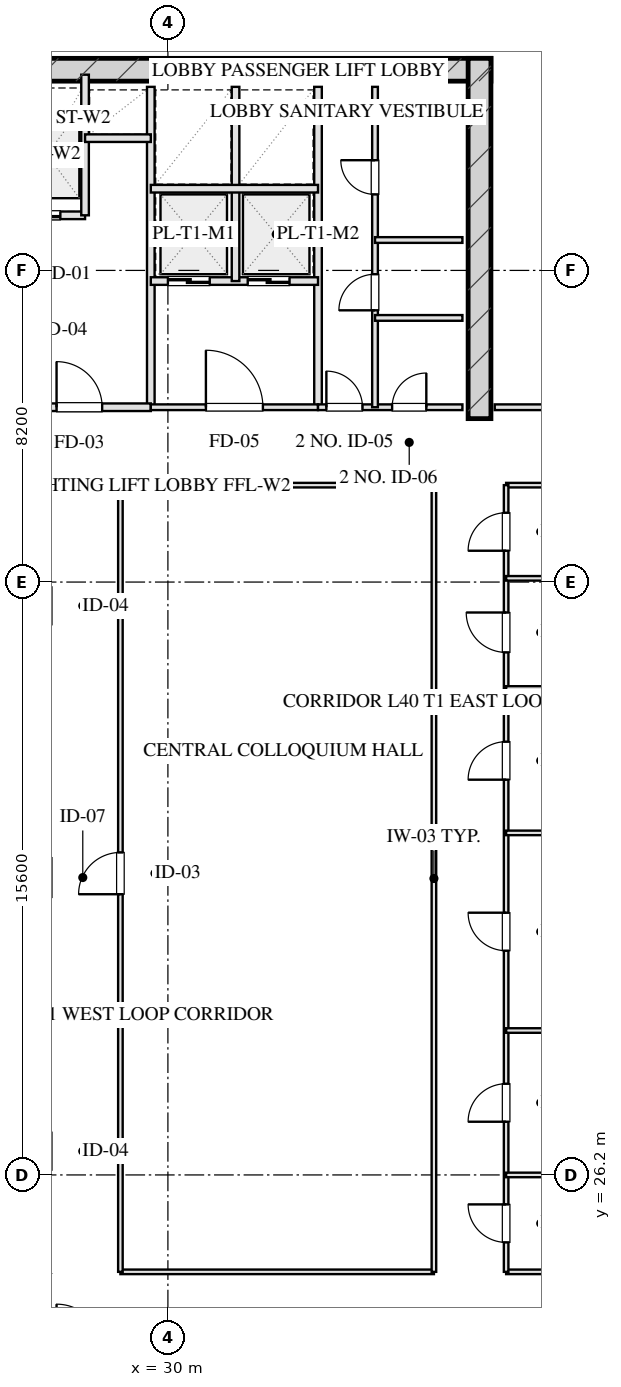
"""IFC4 building model, lengths in metres.
Left out: names, types, materials, properties, quantities, classifications, styles, units other than length and angle.
Written with IfcOpenShell. Run it as: python <this file> out.ifc"""

import sys

from ifc_helpers import new_model, si_unit, direction, frame, frame_2d, origin, place, context, subcontext, project, spatial, rectangle, extrude, element, fill, save


model = new_model("IFC4")
c1 = context("Model", 3, precision=1e-05, world=origin(), true_north=direction((0.0, 1.0)))
c2 = subcontext(c1, "Body", "Model", "MODEL_VIEW")
j1 = project(units=[si_unit("LENGTHUNIT", "METRE"), si_unit("PLANEANGLEUNIT", "RADIAN")], contexts=[c1])
p1 = place(None, origin())
s1 = spatial("IfcSite", under=j1, at=p1, CompositionType="ELEMENT")
p2 = place(p1, origin())
s2 = spatial("IfcBuilding", under=s1, at=p2, CompositionType="ELEMENT")
p3 = place(p2, frame((0.0, 0.0, 152.95)))
s3 = spatial("IfcBuildingStorey", under=s2, at=p3, CompositionType="ELEMENT", Elevation=152.95)
p4 = place(p3, frame((21.5, 55.28, 0.0), z_axis=(0.0, 0.0, 1.0), x_axis=(1.0, 0.0, 0.0)))
e1 = element("IfcWall", 1, at=p4, inside=s3, PredefinedType="SHEAR", context=c2, shape_type="SweptSolid", body=[
    extrude(rectangle(XDim=17.0, YDim=0.6, at=frame_2d((8.5, 0.0))), origin(), (0.0, 0.0, 1.0), 3.45),
])
p5 = place(p3, frame((38.2, 46.1, 0.0), z_axis=(0.0, 0.0, 1.0), x_axis=(0.0, 1.0, 0.0)))
e2 = element("IfcWall", 2, at=p5, inside=s3, PredefinedType="SHEAR", context=c2, shape_type="SweptSolid", body=[
    extrude(rectangle(XDim=9.48, YDim=0.6, at=frame_2d((4.74, 0.0))), origin(), (0.0, 0.0, 1.0), 3.45),
])
p6 = place(p3, frame((29.55, 46.4, 0.0), z_axis=(0.0, 0.0, 1.0), x_axis=(0.0, 1.0, 0.0)))
e3 = element("IfcWall", 3, at=p6, inside=s3, PredefinedType="PARTITIONING", context=c2, shape_type="SweptSolid", body=[
    extrude(rectangle(XDim=8.43, YDim=0.2, at=frame_2d((4.215, 0.0))), origin(), (0.0, 0.0, 1.0), 3.175),
])
p7 = place(p3, frame((25.72, 46.4, 0.0), z_axis=(0.0, 0.0, 1.0), x_axis=(1.0, 0.0, 0.0)))
e4 = element("IfcWall", 4, at=p7, inside=s3, PredefinedType="PARTITIONING", context=c2, shape_type="SweptSolid", body=[
    extrude(rectangle(XDim=3.83, YDim=0.2, at=frame_2d((1.915, 0.0))), origin(), (0.0, 0.0, 1.0), 3.175),
])
p8 = place(p7, frame((1.35, 0.0, 0.0)))
e5 = element("IfcOpeningElement", 5, at=p8, cuts=e4, PredefinedType="OPENING", context=c2, shape_type="SweptSolid", body=[
    extrude(rectangle(XDim=1.2, YDim=2.05, at=frame_2d((0.6, 1.025))), frame((0.0, 0.11, 0.0), z_axis=(0.0, -1.0, 0.0), x_axis=(1.0, 0.0, 0.0)), (0.0, 0.0, 1.0), 0.22),
])
p9 = place(p3, frame((25.72, 51.45, 0.0), z_axis=(0.0, 0.0, 1.0), x_axis=(1.0, 0.0, 0.0)))
e6 = element("IfcWall", 6, at=p9, inside=s3, PredefinedType="PARTITIONING", context=c2, shape_type="SweptSolid", body=[
    extrude(rectangle(XDim=2.1, YDim=0.2, at=frame_2d((1.05, 0.0))), origin(), (0.0, 0.0, 1.0), 3.175),
])
p10 = place(p9, frame((0.35, 0.0, 0.0)))
e7 = element("IfcOpeningElement", 7, at=p10, cuts=e6, PredefinedType="OPENING", context=c2, shape_type="SweptSolid", body=[
    extrude(rectangle(XDim=1.1, YDim=2.05, at=frame_2d((0.55, 1.025))), frame((0.0, 0.11, 0.0), z_axis=(0.0, -1.0, 0.0), x_axis=(1.0, 0.0, 0.0)), (0.0, 0.0, 1.0), 0.22),
])
p11 = place(p3, frame((27.82, 51.45, 0.0), z_axis=(0.0, 0.0, 1.0), x_axis=(0.0, 1.0, 0.0)))
e8 = element("IfcWall", 8, at=p11, inside=s3, PredefinedType="PARTITIONING", context=c2, shape_type="SweptSolid", body=[
    extrude(rectangle(XDim=3.7, YDim=0.2, at=frame_2d((1.85, 0.0))), origin(), (0.0, 0.0, 1.0), 3.175),
])
p12 = place(p3, frame((27.82, 53.48, 0.0), z_axis=(0.0, 0.0, 1.0), x_axis=(1.0, 0.0, 0.0)))
e9 = element("IfcWall", 9, at=p12, inside=s3, PredefinedType="PARTITIONING", context=c2, shape_type="SweptSolid", body=[
    extrude(rectangle(XDim=1.73, YDim=0.2, at=frame_2d((0.865, 0.0))), origin(), (0.0, 0.0, 1.0), 3.175),
])
p13 = place(p3, frame((33.95, 46.4, 0.0), z_axis=(0.0, 0.0, 1.0), x_axis=(0.0, 1.0, 0.0)))
e10 = element("IfcWall", 10, at=p13, inside=s3, PredefinedType="PARTITIONING", context=c2, shape_type="SweptSolid", body=[
    extrude(rectangle(XDim=8.43, YDim=0.2, at=frame_2d((4.215, 0.0))), origin(), (0.0, 0.0, 1.0), 3.175),
])
p14 = place(p3, frame((29.55, 46.4, 0.0), z_axis=(0.0, 0.0, 1.0), x_axis=(1.0, 0.0, 0.0)))
e11 = element("IfcWall", 11, at=p14, inside=s3, PredefinedType="PARTITIONING", context=c2, shape_type="SweptSolid", body=[
    extrude(rectangle(XDim=4.4, YDim=0.15, at=frame_2d((2.2, 0.0))), origin(), (0.0, 0.0, 1.0), 3.175),
])
p15 = place(p14, frame((1.45, 0.0, 0.0)))
e12 = element("IfcOpeningElement", 12, at=p15, cuts=e11, PredefinedType="OPENING", context=c2, shape_type="SweptSolid", body=[
    extrude(rectangle(XDim=1.5, YDim=2.05, at=frame_2d((0.75, 1.025))), frame((0.0, 0.085, 0.0), z_axis=(0.0, -1.0, 0.0), x_axis=(1.0, 0.0, 0.0)), (0.0, 0.0, 1.0), 0.17),
])
p16 = place(p3, frame((29.55, 49.72, 0.0), z_axis=(0.0, 0.0, 1.0), x_axis=(1.0, 0.0, 0.0)))
e13 = element("IfcWall", 13, at=p16, inside=s3, PredefinedType="PARTITIONING", context=c2, shape_type="SweptSolid", body=[
    extrude(rectangle(XDim=4.4, YDim=0.2, at=frame_2d((2.2, 0.0))), origin(), (0.0, 0.0, 1.0), 3.175),
])
p17 = place(p16, frame((0.45, 0.0, 0.0)))
e14 = element("IfcOpeningElement", 14, at=p17, cuts=e13, PredefinedType="OPENING", context=c2, shape_type="SweptSolid", body=[
    extrude(rectangle(XDim=1.1, YDim=2.05, at=frame_2d((0.55, 1.025))), frame((0.0, 0.11, 0.0), z_axis=(0.0, -1.0, 0.0), x_axis=(1.0, 0.0, 0.0)), (0.0, 0.0, 1.0), 0.22),
])
p18 = place(p16, frame((2.55, 0.0, 0.0)))
e15 = element("IfcOpeningElement", 15, at=p18, cuts=e13, PredefinedType="OPENING", context=c2, shape_type="SweptSolid", body=[
    extrude(rectangle(XDim=1.1, YDim=2.05, at=frame_2d((0.55, 1.025))), frame((0.0, 0.11, 0.0), z_axis=(0.0, -1.0, 0.0), x_axis=(1.0, 0.0, 0.0)), (0.0, 0.0, 1.0), 0.22),
])
p19 = place(p3, frame((31.78, 49.72, 0.0), z_axis=(0.0, 0.0, 1.0), x_axis=(0.0, 1.0, 0.0)))
e16 = element("IfcWall", 16, at=p19, inside=s3, PredefinedType="PARTITIONING", context=c2, shape_type="SweptSolid", body=[
    extrude(rectangle(XDim=5.11, YDim=0.2, at=frame_2d((2.555, 0.0))), origin(), (0.0, 0.0, 1.0), 3.175),
])
p20 = place(p3, frame((29.55, 52.15, 0.0), z_axis=(0.0, 0.0, 1.0), x_axis=(1.0, 0.0, 0.0)))
e17 = element("IfcWall", 17, at=p20, inside=s3, PredefinedType="PARTITIONING", context=c2, shape_type="SweptSolid", body=[
    extrude(rectangle(XDim=4.4, YDim=0.2, at=frame_2d((2.2, 0.0))), origin(), (0.0, 0.0, 1.0), 3.175),
])
p21 = place(p3, frame((33.95, 46.4, 0.0), z_axis=(0.0, 0.0, 1.0), x_axis=(1.0, 0.0, 0.0)))
e18 = element("IfcWall", 18, at=p21, inside=s3, PredefinedType="PARTITIONING", context=c2, shape_type="SweptSolid", body=[
    extrude(rectangle(XDim=3.8, YDim=0.15, at=frame_2d((1.9, 0.0))), origin(), (0.0, 0.0, 1.0), 3.175),
])
p22 = place(p21, frame((0.22, 0.0, 0.0)))
e19 = element("IfcOpeningElement", 19, at=p22, cuts=e18, PredefinedType="OPENING", context=c2, shape_type="SweptSolid", body=[
    extrude(rectangle(XDim=0.95, YDim=2.05, at=frame_2d((0.475, 1.025))), frame((0.0, 0.085, 0.0), z_axis=(0.0, -1.0, 0.0), x_axis=(1.0, 0.0, 0.0)), (0.0, 0.0, 1.0), 0.17),
])
p23 = place(p21, frame((1.95, 0.0, 0.0)))
e20 = element("IfcOpeningElement", 20, at=p23, cuts=e18, PredefinedType="OPENING", context=c2, shape_type="SweptSolid", body=[
    extrude(rectangle(XDim=0.9, YDim=2.05, at=frame_2d((0.45, 1.025))), frame((0.0, 0.085, 0.0), z_axis=(0.0, -1.0, 0.0), x_axis=(1.0, 0.0, 0.0)), (0.0, 0.0, 1.0), 0.17),
])
p24 = place(p3, frame((35.45, 46.4, 0.0), z_axis=(0.0, 0.0, 1.0), x_axis=(0.0, 1.0, 0.0)))
e21 = element("IfcWall", 21, at=p24, inside=s3, PredefinedType="PARTITIONING", context=c2, shape_type="SweptSolid", body=[
    extrude(rectangle(XDim=8.43, YDim=0.15, at=frame_2d((4.215, 0.0))), origin(), (0.0, 0.0, 1.0), 2.765),
])
p25 = place(p24, frame((2.55, 0.0, 0.0)))
e22 = element("IfcOpeningElement", 22, at=p25, cuts=e21, PredefinedType="OPENING", context=c2, shape_type="SweptSolid", body=[
    extrude(rectangle(XDim=0.95, YDim=2.05, at=frame_2d((0.475, 1.025))), frame((0.0, 0.085, 0.0), z_axis=(0.0, -1.0, 0.0), x_axis=(1.0, 0.0, 0.0)), (0.0, 0.0, 1.0), 0.17),
])
p26 = place(p24, frame((5.6, 0.0, 0.0)))
e23 = element("IfcOpeningElement", 23, at=p26, cuts=e21, PredefinedType="OPENING", context=c2, shape_type="SweptSolid", body=[
    extrude(rectangle(XDim=0.9, YDim=2.05, at=frame_2d((0.45, 1.025))), frame((0.0, 0.085, 0.0), z_axis=(0.0, -1.0, 0.0), x_axis=(1.0, 0.0, 0.0)), (0.0, 0.0, 1.0), 0.17),
])
for number, where, z_axis, x_axis in (
    (24, (35.45, 50.8, 0.0), (0.0, 0.0, 1.0), (1.0, 0.0, 0.0)),
    (25, (35.45, 48.75, 0.0), (0.0, 0.0, 1.0), (1.0, 0.0, 0.0)),
):
    element("IfcWall", number, at=place(p3, frame(where, z_axis=z_axis, x_axis=x_axis)), inside=s3, PredefinedType="PARTITIONING", context=c2, shape_type="SweptSolid", body=[
        extrude(rectangle(XDim=2.3, YDim=0.15, at=frame_2d((1.15, 0.0))), origin(), (0.0, 0.0, 1.0), 3.175),
    ])
p27 = place(p3, frame((38.6, 46.4, 0.0), z_axis=(0.0, 0.0, 1.0), x_axis=(1.0, 0.0, 0.0)))
e26 = element("IfcWall", 26, at=p27, inside=s3, PredefinedType="PARTITIONING", context=c2, shape_type="SweptSolid", body=[
    extrude(rectangle(XDim=10.0, YDim=0.15, at=frame_2d((5.0, 0.0))), origin(), (0.0, 0.0, 1.0), 3.175),
])
p28 = place(p27, frame((4.2, 0.0, 0.0)))
e27 = element("IfcOpeningElement", 27, at=p28, cuts=e26, PredefinedType="OPENING", context=c2, shape_type="SweptSolid", body=[
    extrude(rectangle(XDim=1.0, YDim=2.05, at=frame_2d((0.5, 1.025))), frame((0.0, 0.085, 0.0), z_axis=(0.0, -1.0, 0.0), x_axis=(1.0, 0.0, 0.0)), (0.0, 0.0, 1.0), 0.17),
])
p29 = place(p3, frame((28.75, 23.65, 0.0), z_axis=(0.0, 0.0, 1.0), x_axis=(1.0, 0.0, 0.0)))
e28 = element("IfcWall", 28, at=p29, inside=s3, PredefinedType="PARTITIONING", context=c2, shape_type="SweptSolid", body=[
    extrude(rectangle(XDim=8.25, YDim=0.12, at=frame_2d((4.125, 0.0))), origin(), (0.0, 0.0, 1.0), 3.175),
])
p30 = place(p3, frame((38.9, 23.65, 0.0), z_axis=(0.0, 0.0, 1.0), x_axis=(1.0, 0.0, 0.0)))
e29 = element("IfcWall", 29, at=p30, inside=s3, PredefinedType="PARTITIONING", context=c2, shape_type="SweptSolid", body=[
    extrude(rectangle(XDim=9.7, YDim=0.12, at=frame_2d((4.85, 0.0))), origin(), (0.0, 0.0, 1.0), 3.175),
])
p31 = place(p3, frame((28.75, 44.35, 0.0), z_axis=(0.0, 0.0, 1.0), x_axis=(1.0, 0.0, 0.0)))
e30 = element("IfcWall", 30, at=p31, inside=s3, PredefinedType="PARTITIONING", context=c2, shape_type="SweptSolid", body=[
    extrude(rectangle(XDim=8.25, YDim=0.12, at=frame_2d((4.125, 0.0))), origin(), (0.0, 0.0, 1.0), 3.175),
])
p32 = place(p3, frame((38.9, 44.35, 0.0), z_axis=(0.0, 0.0, 1.0), x_axis=(1.0, 0.0, 0.0)))
e31 = element("IfcWall", 31, at=p32, inside=s3, PredefinedType="PARTITIONING", context=c2, shape_type="SweptSolid", body=[
    extrude(rectangle(XDim=9.7, YDim=0.12, at=frame_2d((4.85, 0.0))), origin(), (0.0, 0.0, 1.0), 3.175),
])
p33 = place(p3, frame((28.75, 23.65, 0.0), z_axis=(0.0, 0.0, 1.0), x_axis=(0.0, 1.0, 0.0)))
e32 = element("IfcWall", 32, at=p33, inside=s3, PredefinedType="PARTITIONING", context=c2, shape_type="SweptSolid", body=[
    extrude(rectangle(XDim=20.7, YDim=0.12, at=frame_2d((10.35, 0.0))), origin(), (0.0, 0.0, 1.0), 3.175),
])
p34 = place(p33, frame((9.936, 0.0, 0.0)))
e33 = element("IfcOpeningElement", 33, at=p34, cuts=e32, PredefinedType="OPENING", context=c2, shape_type="SweptSolid", body=[
    extrude(rectangle(XDim=1.1, YDim=2.05, at=frame_2d((0.55, 1.025))), frame((0.0, 0.07, 0.0), z_axis=(0.0, -1.0, 0.0), x_axis=(1.0, 0.0, 0.0)), (0.0, 0.0, 1.0), 0.14),
])
p35 = place(p3, frame((37.0, 23.65, 0.0), z_axis=(0.0, 0.0, 1.0), x_axis=(0.0, 1.0, 0.0)))
e34 = element("IfcWall", 34, at=p35, inside=s3, PredefinedType="PARTITIONING", context=c2, shape_type="SweptSolid", body=[
    extrude(rectangle(XDim=20.7, YDim=0.12, at=frame_2d((10.35, 0.0))), origin(), (0.0, 0.0, 1.0), 3.175),
])
p36 = place(p3, frame((38.9, 23.65, 0.0), z_axis=(0.0, 0.0, 1.0), x_axis=(0.0, 1.0, 0.0)))
e35 = element("IfcWall", 35, at=p36, inside=s3, PredefinedType="PARTITIONING", context=c2, shape_type="SweptSolid", body=[
    extrude(rectangle(XDim=20.7, YDim=0.12, at=frame_2d((10.35, 0.0))), origin(), (0.0, 0.0, 1.0), 3.175),
])
p37 = place(p36, frame((0.775, 0.0, 0.0)))
e36 = element("IfcOpeningElement", 36, at=p37, cuts=e35, PredefinedType="OPENING", context=c2, shape_type="SweptSolid", body=[
    extrude(rectangle(XDim=1.0, YDim=2.05, at=frame_2d((0.5, 1.025))), frame((0.0, 0.07, 0.0), z_axis=(0.0, -1.0, 0.0), x_axis=(1.0, 0.0, 0.0)), (0.0, 0.0, 1.0), 0.14),
])
p38 = place(p36, frame((3.95, 0.0, 0.0)))
e37 = element("IfcOpeningElement", 37, at=p38, cuts=e35, PredefinedType="OPENING", context=c2, shape_type="SweptSolid", body=[
    extrude(rectangle(XDim=1.0, YDim=2.05, at=frame_2d((0.5, 1.025))), frame((0.0, 0.07, 0.0), z_axis=(0.0, -1.0, 0.0), x_axis=(1.0, 0.0, 0.0)), (0.0, 0.0, 1.0), 0.14),
])
p39 = place(p36, frame((8.45, 0.0, 0.0)))
e38 = element("IfcOpeningElement", 38, at=p39, cuts=e35, PredefinedType="OPENING", context=c2, shape_type="SweptSolid", body=[
    extrude(rectangle(XDim=1.0, YDim=2.05, at=frame_2d((0.5, 1.025))), frame((0.0, 0.07, 0.0), z_axis=(0.0, -1.0, 0.0), x_axis=(1.0, 0.0, 0.0)), (0.0, 0.0, 1.0), 0.14),
])
p40 = place(p36, frame((12.95, 0.0, 0.0)))
e39 = element("IfcOpeningElement", 39, at=p40, cuts=e35, PredefinedType="OPENING", context=c2, shape_type="SweptSolid", body=[
    extrude(rectangle(XDim=1.0, YDim=2.05, at=frame_2d((0.5, 1.025))), frame((0.0, 0.07, 0.0), z_axis=(0.0, -1.0, 0.0), x_axis=(1.0, 0.0, 0.0)), (0.0, 0.0, 1.0), 0.14),
])
p41 = place(p36, frame((16.299, 0.0, 0.0)))
e40 = element("IfcOpeningElement", 40, at=p41, cuts=e35, PredefinedType="OPENING", context=c2, shape_type="SweptSolid", body=[
    extrude(rectangle(XDim=1.05, YDim=2.05, at=frame_2d((0.525, 1.025))), frame((0.0, 0.07, 0.0), z_axis=(0.0, -1.0, 0.0), x_axis=(1.0, 0.0, 0.0)), (0.0, 0.0, 1.0), 0.14),
])
p42 = place(p36, frame((18.974, 0.0, 0.0)))
e41 = element("IfcOpeningElement", 41, at=p42, cuts=e35, PredefinedType="OPENING", context=c2, shape_type="SweptSolid", body=[
    extrude(rectangle(XDim=1.0, YDim=2.05, at=frame_2d((0.5, 1.025))), frame((0.0, 0.07, 0.0), z_axis=(0.0, -1.0, 0.0), x_axis=(1.0, 0.0, 0.0)), (0.0, 0.0, 1.0), 0.14),
])
for number, where, z_axis, x_axis in (
    (42, (38.9, 26.2, 0.0), (0.0, 0.0, 1.0), (1.0, 0.0, 0.0)),
    (43, (38.9, 30.0, 0.0), (0.0, 0.0, 1.0), (1.0, 0.0, 0.0)),
    (44, (38.9, 35.2, 0.0), (0.0, 0.0, 1.0), (1.0, 0.0, 0.0)),
    (45, (38.9, 39.0, 0.0), (0.0, 0.0, 1.0), (1.0, 0.0, 0.0)),
    (46, (38.9, 41.898, 0.0), (0.0, 0.0, 1.0), (1.0, 0.0, 0.0)),
):
    element("IfcWall", number, at=place(p3, frame(where, z_axis=z_axis, x_axis=x_axis)), inside=s3, PredefinedType="PARTITIONING", context=c2, shape_type="SweptSolid", body=[
        extrude(rectangle(XDim=9.7, YDim=0.12, at=frame_2d((4.85, 0.0))), origin(), (0.0, 0.0, 1.0), 3.175),
    ])
p43 = place(p8, origin())
e47 = element("IfcDoor", 47, at=p43, inside=s3, OperationType="SINGLE_SWING_LEFT", PredefinedType="DOOR", context=c2, shape_type="SweptSolid", body=[
    extrude(rectangle(XDim=1.2, YDim=2.05, at=frame_2d((0.6, 1.025))), frame((0.0, 0.025, 0.0), z_axis=(0.0, -1.0, 0.0), x_axis=(1.0, 0.0, 0.0)), (0.0, 0.0, 1.0), 0.05),
])
fill(e5, e47)
p44 = place(p10, origin())
e48 = element("IfcDoor", 48, at=p44, inside=s3, OperationType="DOUBLE_DOOR_SLIDING", PredefinedType="DOOR", context=c2, shape_type="SweptSolid", body=[
    extrude(rectangle(XDim=1.1, YDim=2.05, at=frame_2d((0.55, 1.025))), frame((0.0, 0.025, 0.0), z_axis=(0.0, -1.0, 0.0), x_axis=(1.0, 0.0, 0.0)), (0.0, 0.0, 1.0), 0.05),
])
fill(e7, e48)
p45 = place(p15, origin())
e49 = element("IfcDoor", 49, at=p45, inside=s3, OperationType="SINGLE_SWING_LEFT", PredefinedType="DOOR", context=c2, shape_type="SweptSolid", body=[
    extrude(rectangle(XDim=1.5, YDim=2.05, at=frame_2d((0.75, 1.025))), frame((0.0, 0.025, 0.0), z_axis=(0.0, -1.0, 0.0), x_axis=(1.0, 0.0, 0.0)), (0.0, 0.0, 1.0), 0.05),
])
fill(e12, e49)
p46 = place(p17, origin())
e50 = element("IfcDoor", 50, at=p46, inside=s3, OperationType="DOUBLE_DOOR_SLIDING", PredefinedType="DOOR", context=c2, shape_type="SweptSolid", body=[
    extrude(rectangle(XDim=1.1, YDim=2.05, at=frame_2d((0.55, 1.025))), frame((0.0, 0.025, 0.0), z_axis=(0.0, -1.0, 0.0), x_axis=(1.0, 0.0, 0.0)), (0.0, 0.0, 1.0), 0.05),
])
fill(e14, e50)
p47 = place(p18, origin())
e51 = element("IfcDoor", 51, at=p47, inside=s3, OperationType="DOUBLE_DOOR_SLIDING", PredefinedType="DOOR", context=c2, shape_type="SweptSolid", body=[
    extrude(rectangle(XDim=1.1, YDim=2.05, at=frame_2d((0.55, 1.025))), frame((0.0, 0.025, 0.0), z_axis=(0.0, -1.0, 0.0), x_axis=(1.0, 0.0, 0.0)), (0.0, 0.0, 1.0), 0.05),
])
fill(e15, e51)
p48 = place(p22, origin())
e52 = element("IfcDoor", 52, at=p48, inside=s3, OperationType="SINGLE_SWING_LEFT", PredefinedType="DOOR", context=c2, shape_type="SweptSolid", body=[
    extrude(rectangle(XDim=0.95, YDim=2.05, at=frame_2d((0.475, 1.025))), frame((0.0, 0.025, 0.0), z_axis=(0.0, -1.0, 0.0), x_axis=(1.0, 0.0, 0.0)), (0.0, 0.0, 1.0), 0.05),
])
fill(e19, e52)
p49 = place(p23, origin())
e53 = element("IfcDoor", 53, at=p49, inside=s3, OperationType="SINGLE_SWING_RIGHT", PredefinedType="DOOR", context=c2, shape_type="SweptSolid", body=[
    extrude(rectangle(XDim=0.9, YDim=2.05, at=frame_2d((0.45, 1.025))), frame((0.0, 0.025, 0.0), z_axis=(0.0, -1.0, 0.0), x_axis=(1.0, 0.0, 0.0)), (0.0, 0.0, 1.0), 0.05),
])
fill(e20, e53)
p50 = place(p25, origin())
e54 = element("IfcDoor", 54, at=p50, inside=s3, OperationType="SINGLE_SWING_LEFT", PredefinedType="DOOR", context=c2, shape_type="SweptSolid", body=[
    extrude(rectangle(XDim=0.95, YDim=2.05, at=frame_2d((0.475, 1.025))), frame((0.0, 0.025, 0.0), z_axis=(0.0, -1.0, 0.0), x_axis=(1.0, 0.0, 0.0)), (0.0, 0.0, 1.0), 0.05),
])
fill(e22, e54)
p51 = place(p26, origin())
e55 = element("IfcDoor", 55, at=p51, inside=s3, OperationType="SINGLE_SWING_RIGHT", PredefinedType="DOOR", context=c2, shape_type="SweptSolid", body=[
    extrude(rectangle(XDim=0.9, YDim=2.05, at=frame_2d((0.45, 1.025))), frame((0.0, 0.025, 0.0), z_axis=(0.0, -1.0, 0.0), x_axis=(1.0, 0.0, 0.0)), (0.0, 0.0, 1.0), 0.05),
])
fill(e23, e55)
p52 = place(p34, origin())
e56 = element("IfcDoor", 56, at=p52, inside=s3, OperationType="SINGLE_SWING_LEFT", PredefinedType="DOOR", context=c2, shape_type="SweptSolid", body=[
    extrude(rectangle(XDim=1.1, YDim=2.05, at=frame_2d((0.55, 1.025))), frame((0.0, 0.025, 0.0), z_axis=(0.0, -1.0, 0.0), x_axis=(1.0, 0.0, 0.0)), (0.0, 0.0, 1.0), 0.05),
])
fill(e33, e56)
p53 = place(p37, origin())
e57 = element("IfcDoor", 57, at=p53, inside=s3, OperationType="SINGLE_SWING_RIGHT", PredefinedType="DOOR", context=c2, shape_type="SweptSolid", body=[
    extrude(rectangle(XDim=1.0, YDim=2.05, at=frame_2d((0.5, 1.025))), frame((0.0, 0.025, 0.0), z_axis=(0.0, -1.0, 0.0), x_axis=(1.0, 0.0, 0.0)), (0.0, 0.0, 1.0), 0.05),
])
fill(e36, e57)
p54 = place(p38, origin())
e58 = element("IfcDoor", 58, at=p54, inside=s3, OperationType="SINGLE_SWING_LEFT", PredefinedType="DOOR", context=c2, shape_type="SweptSolid", body=[
    extrude(rectangle(XDim=1.0, YDim=2.05, at=frame_2d((0.5, 1.025))), frame((0.0, 0.025, 0.0), z_axis=(0.0, -1.0, 0.0), x_axis=(1.0, 0.0, 0.0)), (0.0, 0.0, 1.0), 0.05),
])
fill(e37, e58)
p55 = place(p39, origin())
e59 = element("IfcDoor", 59, at=p55, inside=s3, OperationType="SINGLE_SWING_RIGHT", PredefinedType="DOOR", context=c2, shape_type="SweptSolid", body=[
    extrude(rectangle(XDim=1.0, YDim=2.05, at=frame_2d((0.5, 1.025))), frame((0.0, 0.025, 0.0), z_axis=(0.0, -1.0, 0.0), x_axis=(1.0, 0.0, 0.0)), (0.0, 0.0, 1.0), 0.05),
])
fill(e38, e59)
p56 = place(p40, origin())
e60 = element("IfcDoor", 60, at=p56, inside=s3, OperationType="SINGLE_SWING_LEFT", PredefinedType="DOOR", context=c2, shape_type="SweptSolid", body=[
    extrude(rectangle(XDim=1.0, YDim=2.05, at=frame_2d((0.5, 1.025))), frame((0.0, 0.025, 0.0), z_axis=(0.0, -1.0, 0.0), x_axis=(1.0, 0.0, 0.0)), (0.0, 0.0, 1.0), 0.05),
])
fill(e39, e60)
p57 = place(p41, origin())
e61 = element("IfcDoor", 61, at=p57, inside=s3, OperationType="SINGLE_SWING_RIGHT", PredefinedType="DOOR", context=c2, shape_type="SweptSolid", body=[
    extrude(rectangle(XDim=1.05, YDim=2.05, at=frame_2d((0.525, 1.025))), frame((0.0, 0.025, 0.0), z_axis=(0.0, -1.0, 0.0), x_axis=(1.0, 0.0, 0.0)), (0.0, 0.0, 1.0), 0.05),
])
fill(e40, e61)
p58 = place(p42, origin())
e62 = element("IfcDoor", 62, at=p58, inside=s3, OperationType="SINGLE_SWING_LEFT", PredefinedType="DOOR", context=c2, shape_type="SweptSolid", body=[
    extrude(rectangle(XDim=1.0, YDim=2.05, at=frame_2d((0.5, 1.025))), frame((0.0, 0.025, 0.0), z_axis=(0.0, -1.0, 0.0), x_axis=(1.0, 0.0, 0.0)), (0.0, 0.0, 1.0), 0.05),
])
fill(e41, e62)
save(model, sys.argv[1])
